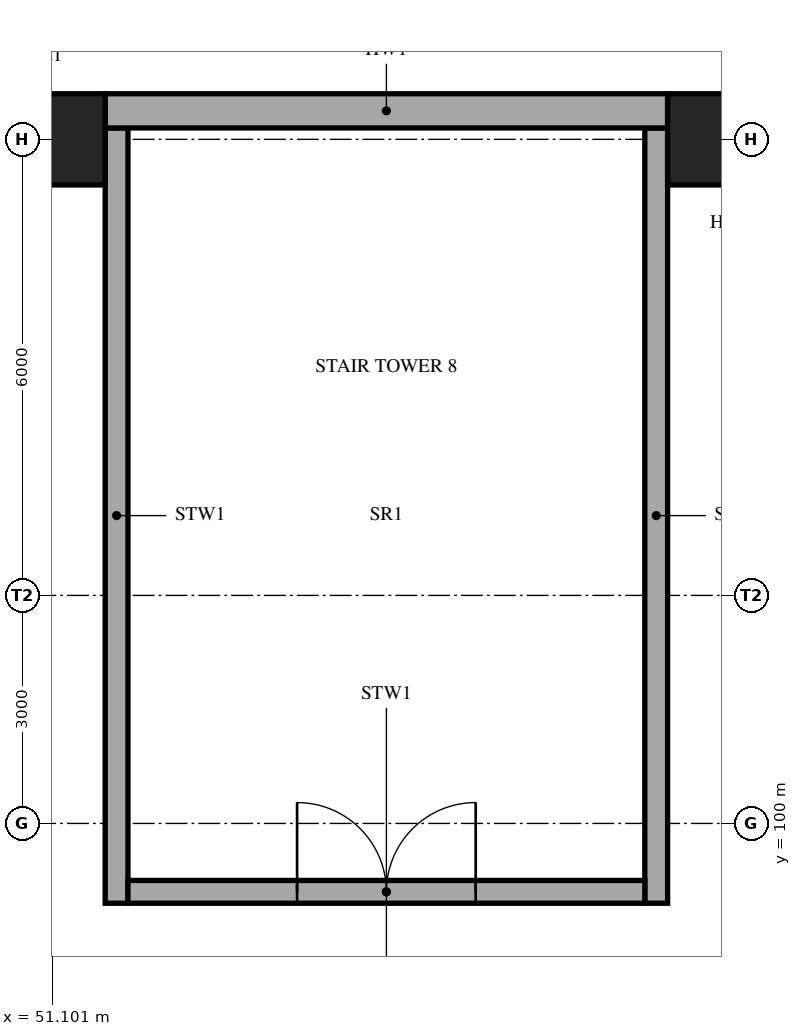
"""IFC4 building model, lengths in metres.
Left out: names, types, materials, properties, quantities, classifications, styles, units other than length and angle.
Written with IfcOpenShell. Run it as: python <this file> out.ifc"""

import sys

from ifc_helpers import new_model, si_unit, direction, frame, frame_2d, origin, origin_2d, place, context, subcontext, project, spatial, rectangle, extrude, element, fill, save


model = new_model("IFC4")
c1 = context("Model", 3, precision=1e-05, world=origin(), true_north=direction((0.0, 1.0)))
c2 = subcontext(c1, "Body", "Model", "MODEL_VIEW")
j1 = project(units=[si_unit("LENGTHUNIT", "METRE"), si_unit("PLANEANGLEUNIT", "RADIAN")], contexts=[c1])
p1 = place(None, origin())
s1 = spatial("IfcSite", under=j1, at=p1, CompositionType="ELEMENT")
p2 = place(p1, origin())
s2 = spatial("IfcBuilding", under=s1, at=p2, CompositionType="ELEMENT")
p3 = place(p2, frame((0.0, 0.0, 15.0)))
s3 = spatial("IfcBuildingStorey", under=s2, at=p3, CompositionType="ELEMENT", Elevation=15.0)
for number, where, z_axis, x_axis in (
    (1, (51.0, 109.0, 0.0), (0.0, 0.0, 1.0), (1.0, 0.0, 0.0)),
    (2, (60.0, 109.0, 0.0), (0.0, 0.0, 1.0), (1.0, 0.0, 0.0)),
):
    element("IfcColumn", number, at=place(p3, frame(where, z_axis=z_axis, x_axis=x_axis)), inside=s3, PredefinedType="COLUMN", context=c2, shape_type="SweptSolid", body=[
        extrude(rectangle(XDim=1.6, YDim=1.2, at=origin_2d()), origin(), (0.0, 0.0, 1.0), 4.2),
    ])
for number, where, z_axis, x_axis in (
    (3, (51.95, 109.15, 0.0), (0.0, 0.0, 1.0), (0.0, -1.0, 0.0)),
    (4, (59.05, 109.15, 0.0), (0.0, 0.0, 1.0), (0.0, -1.0, 0.0)),
):
    element("IfcWall", number, at=place(p3, frame(where, z_axis=z_axis, x_axis=x_axis)), inside=s3, PredefinedType="SHEAR", context=c2, shape_type="SweptSolid", body=[
        extrude(rectangle(XDim=10.2, YDim=0.3, at=frame_2d((5.1, 0.0))), origin(), (0.0, 0.0, 1.0), 3.9),
    ])
p4 = place(p3, frame((52.1, 99.1, 0.0), z_axis=(0.0, 0.0, 1.0), x_axis=(1.0, 0.0, 0.0)))
e5 = element("IfcWall", 5, at=p4, inside=s3, PredefinedType="SHEAR", context=c2, shape_type="SweptSolid", body=[
    extrude(rectangle(XDim=6.8, YDim=0.3, at=frame_2d((3.4, 0.0))), origin(), (0.0, 0.0, 1.0), 3.9),
])
p5 = place(p4, frame((2.225, 0.0, 0.0)))
e6 = element("IfcOpeningElement", 6, at=p5, cuts=e5, PredefinedType="OPENING", context=c2, shape_type="SweptSolid", body=[
    extrude(rectangle(XDim=2.35, YDim=2.1, at=frame_2d((1.175, 1.05))), frame((0.0, 0.16, 0.0), z_axis=(0.0, -1.0, 0.0), x_axis=(1.0, 0.0, 0.0)), (0.0, 0.0, 1.0), 0.32),
])
p6 = place(p3, frame((51.8, 109.375, 0.0), z_axis=(0.0, 0.0, 1.0), x_axis=(1.0, 0.0, 0.0)))
e7 = element("IfcWall", 7, at=p6, inside=s3, PredefinedType="SOLIDWALL", context=c2, shape_type="SweptSolid", body=[
    extrude(rectangle(XDim=7.4, YDim=0.45, at=frame_2d((3.7, 0.0))), origin(), (0.0, 0.0, 1.0), 4.2),
])
p7 = place(p5, origin())
e8 = element("IfcDoor", 8, at=p7, inside=s3, OperationType="DOUBLE_DOOR_SINGLE_SWING", PredefinedType="DOOR", context=c2, shape_type="SweptSolid", body=[
    extrude(rectangle(XDim=2.35, YDim=2.1, at=frame_2d((1.175, 1.05))), frame((0.0, 0.025, 0.0), z_axis=(0.0, -1.0, 0.0), x_axis=(1.0, 0.0, 0.0)), (0.0, 0.0, 1.0), 0.05),
])
fill(e6, e8)
save(model, sys.argv[1])
